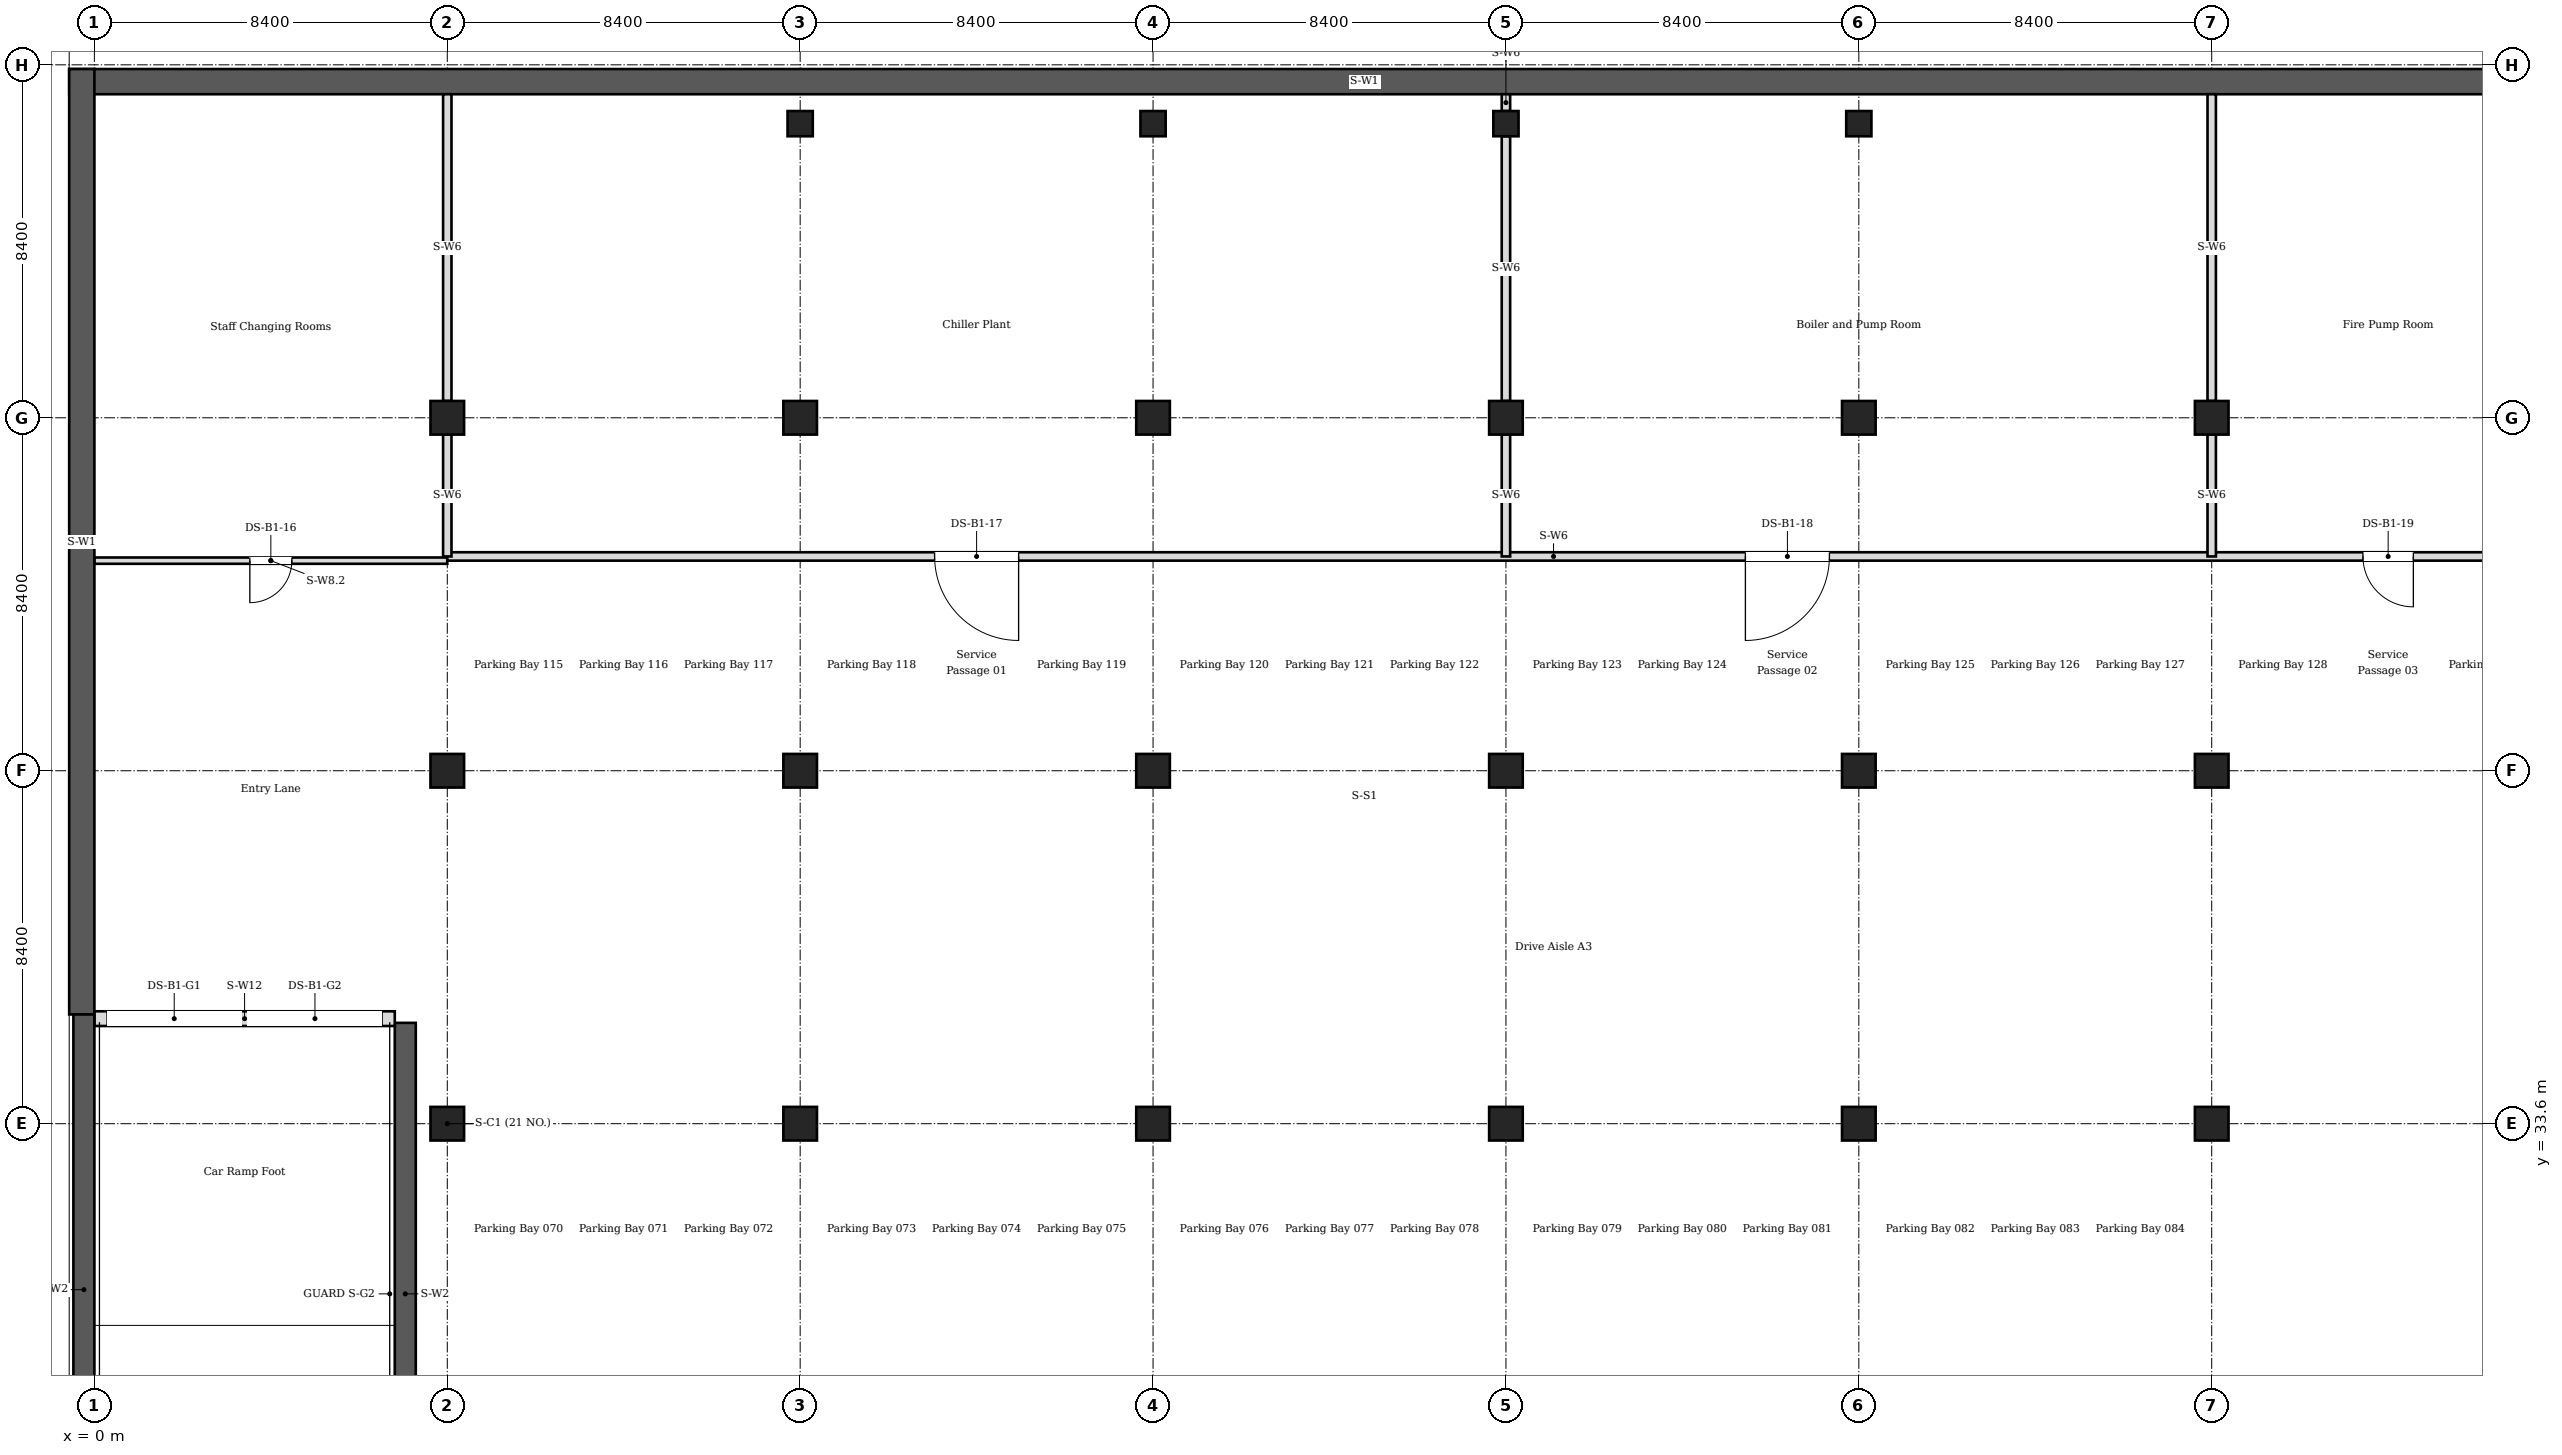
"""IFC4 building model, lengths in metres.
Left out: names, types, materials, properties, quantities, classifications, styles, units other than length and angle.
Written with IfcOpenShell. Run it as: python <this file> out.ifc"""

import sys

from ifc_helpers import new_model, si_unit, direction, frame, frame_2d, origin, origin_2d, place, context, subcontext, project, spatial, rectangle, extrude, element, fill, save


model = new_model("IFC4")
c1 = context("Model", 3, precision=1e-05, world=origin(), true_north=direction((0.0, 1.0)))
c2 = subcontext(c1, "Body", "Model", "MODEL_VIEW")
j1 = project(units=[si_unit("LENGTHUNIT", "METRE"), si_unit("PLANEANGLEUNIT", "RADIAN")], contexts=[c1])
p1 = place(None, origin())
s1 = spatial("IfcSite", under=j1, at=p1, CompositionType="ELEMENT")
p2 = place(p1, origin())
s2 = spatial("IfcBuilding", under=s1, at=p2, CompositionType="ELEMENT")
p3 = place(p2, frame((0.0, 0.0, -5.4)))
s3 = spatial("IfcBuildingStorey", under=s2, at=p3, CompositionType="ELEMENT", Elevation=-5.4)
p4 = place(p3, frame((156.5, 58.4, 0.0), z_axis=(0.0, 0.0, 1.0), x_axis=(-1.0, 0.0, 0.0)))
e1 = element("IfcWall", 1, at=p4, inside=s3, PredefinedType="SOLIDWALL", context=c2, shape_type="SweptSolid", body=[
    extrude(rectangle(XDim=157.1, YDim=0.6, at=frame_2d((78.55, 0.0))), origin(), (0.0, 0.0, 1.0), 4.95),
])
p5 = place(p3, frame((-0.3, 58.7, 0.0), z_axis=(0.0, 0.0, 1.0), x_axis=(0.0, -1.0, 0.0)))
e2 = element("IfcWall", 2, at=p5, inside=s3, PredefinedType="SOLIDWALL", context=c2, shape_type="SweptSolid", body=[
    extrude(rectangle(XDim=22.5, YDim=0.6, at=frame_2d((11.25, 0.0))), origin(), (0.0, 0.0, 1.0), 4.95),
])
p6 = place(p3, frame((-0.25, -10.5, -1.2), z_axis=(0.0, 0.0, 1.0), x_axis=(0.0, 1.0, 0.0)))
e3 = element("IfcWall", 3, at=p6, inside=s3, PredefinedType="SOLIDWALL", context=c2, shape_type="SweptSolid", body=[
    extrude(rectangle(XDim=46.7, YDim=0.5, at=frame_2d((23.35, 0.0))), origin(), (0.0, 0.0, 1.0), 6.6),
])
p7 = place(p3, frame((7.4, -10.5, -1.2), z_axis=(0.0, 0.0, 1.0), x_axis=(0.0, 1.0, 0.0)))
e4 = element("IfcWall", 4, at=p7, inside=s3, PredefinedType="SOLIDWALL", context=c2, shape_type="SweptSolid", body=[
    extrude(rectangle(XDim=46.5, YDim=0.5, at=frame_2d((23.25, 0.0))), origin(), (0.0, 0.0, 1.0), 6.6),
])
p8 = place(p3, frame((0.0, 36.1, 0.0), z_axis=(0.0, 0.0, 1.0), x_axis=(1.0, 0.0, 0.0)))
e5 = element("IfcWall", 5, at=p8, inside=s3, PredefinedType="SOLIDWALL", context=c2, shape_type="SweptSolid", body=[
    extrude(rectangle(XDim=7.15, YDim=0.35, at=frame_2d((3.575, 0.0))), origin(), (0.0, 0.0, 1.0), 4.95),
])
p9 = place(p8, frame((0.3, 0.0, 0.0)))
e6 = element("IfcOpeningElement", 6, at=p9, cuts=e5, PredefinedType="OPENING", context=c2, shape_type="SweptSolid", body=[
    extrude(rectangle(XDim=3.2, YDim=2.4, at=frame_2d((1.6, 1.2))), frame((0.0, 0.185, 0.0), z_axis=(0.0, -1.0, 0.0), x_axis=(1.0, 0.0, 0.0)), (0.0, 0.0, 1.0), 0.37),
])
p10 = place(p8, frame((3.65, 0.0, 0.0)))
e7 = element("IfcOpeningElement", 7, at=p10, cuts=e5, PredefinedType="OPENING", context=c2, shape_type="SweptSolid", body=[
    extrude(rectangle(XDim=3.2, YDim=2.4, at=frame_2d((1.6, 1.2))), frame((0.0, 0.185, 0.0), z_axis=(0.0, -1.0, 0.0), x_axis=(1.0, 0.0, 0.0)), (0.0, 0.0, 1.0), 0.37),
])
for number, where, z_axis, x_axis in (
    (8, (8.4, 33.6, 0.0), (0.0, 0.0, 1.0), (1.0, 0.0, 0.0)),
    (9, (8.4, 42.0, 0.0), (0.0, 0.0, 1.0), (1.0, 0.0, 0.0)),
    (10, (8.4, 50.4, 0.0), (0.0, 0.0, 1.0), (1.0, 0.0, 0.0)),
    (11, (16.8, 33.6, 0.0), (0.0, 0.0, 1.0), (1.0, 0.0, 0.0)),
    (12, (16.8, 42.0, 0.0), (0.0, 0.0, 1.0), (1.0, 0.0, 0.0)),
    (13, (16.8, 50.4, 0.0), (0.0, 0.0, 1.0), (1.0, 0.0, 0.0)),
    (14, (25.2, 33.6, 0.0), (0.0, 0.0, 1.0), (1.0, 0.0, 0.0)),
    (15, (25.2, 42.0, 0.0), (0.0, 0.0, 1.0), (1.0, 0.0, 0.0)),
    (16, (25.2, 50.4, 0.0), (0.0, 0.0, 1.0), (1.0, 0.0, 0.0)),
    (17, (33.6, 33.6, 0.0), (0.0, 0.0, 1.0), (1.0, 0.0, 0.0)),
    (18, (33.6, 42.0, 0.0), (0.0, 0.0, 1.0), (1.0, 0.0, 0.0)),
    (19, (33.6, 50.4, 0.0), (0.0, 0.0, 1.0), (1.0, 0.0, 0.0)),
    (20, (42.0, 33.6, 0.0), (0.0, 0.0, 1.0), (1.0, 0.0, 0.0)),
    (21, (42.0, 42.0, 0.0), (0.0, 0.0, 1.0), (1.0, 0.0, 0.0)),
    (22, (42.0, 50.4, 0.0), (0.0, 0.0, 1.0), (1.0, 0.0, 0.0)),
    (23, (50.4, 33.6, 0.0), (0.0, 0.0, 1.0), (1.0, 0.0, 0.0)),
    (24, (50.4, 42.0, 0.0), (0.0, 0.0, 1.0), (1.0, 0.0, 0.0)),
    (25, (50.4, 50.4, 0.0), (0.0, 0.0, 1.0), (1.0, 0.0, 0.0)),
):
    element("IfcColumn", number, at=place(p3, frame(where, z_axis=z_axis, x_axis=x_axis)), inside=s3, PredefinedType="COLUMN", context=c2, shape_type="SweptSolid", body=[
        extrude(rectangle(XDim=0.8, YDim=0.8, at=origin_2d()), origin(), (0.0, 0.0, 1.0), 5.4),
    ])
for number, where, z_axis, x_axis in (
    (26, (16.8, 57.4, 0.0), (0.0, 0.0, 1.0), (1.0, 0.0, 0.0)),
    (27, (25.2, 57.4, 0.0), (0.0, 0.0, 1.0), (1.0, 0.0, 0.0)),
    (28, (33.6, 57.4, 0.0), (0.0, 0.0, 1.0), (1.0, 0.0, 0.0)),
    (29, (42.0, 57.4, 0.0), (0.0, 0.0, 1.0), (1.0, 0.0, 0.0)),
):
    element("IfcColumn", number, at=place(p3, frame(where, z_axis=z_axis, x_axis=x_axis)), inside=s3, PredefinedType="COLUMN", context=c2, shape_type="SweptSolid", body=[
        extrude(rectangle(XDim=0.6, YDim=0.6, at=origin_2d()), origin(), (0.0, 0.0, 1.0), 5.4),
    ])
p11 = place(p3, frame((0.0, 47.0, 0.0), z_axis=(0.0, 0.0, 1.0), x_axis=(1.0, 0.0, 0.0)))
e30 = element("IfcWall", 30, at=p11, inside=s3, PredefinedType="PARTITIONING", context=c2, shape_type="SweptSolid", body=[
    extrude(rectangle(XDim=8.4, YDim=0.15, at=frame_2d((4.2, 0.0))), origin(), (0.0, 0.0, 1.0), 4.95),
])
p12 = place(p11, frame((3.7, 0.0, 0.0)))
e31 = element("IfcOpeningElement", 31, at=p12, cuts=e30, PredefinedType="OPENING", context=c2, shape_type="SweptSolid", body=[
    extrude(rectangle(XDim=1.0, YDim=2.1, at=frame_2d((0.5, 1.05))), frame((0.0, 0.085, 0.0), z_axis=(0.0, -1.0, 0.0), x_axis=(1.0, 0.0, 0.0)), (0.0, 0.0, 1.0), 0.17),
])
p13 = place(p3, frame((8.4, 47.1, 0.0), z_axis=(0.0, 0.0, 1.0), x_axis=(1.0, 0.0, 0.0)))
e32 = element("IfcWall", 32, at=p13, inside=s3, PredefinedType="PARTITIONING", context=c2, shape_type="SweptSolid", body=[
    extrude(rectangle(XDim=134.4, YDim=0.2, at=frame_2d((67.2, 0.0))), origin(), (0.0, 0.0, 1.0), 4.95),
])
p14 = place(p13, frame((11.6, 0.0, 0.0)))
e33 = element("IfcOpeningElement", 33, at=p14, cuts=e32, PredefinedType="OPENING", context=c2, shape_type="SweptSolid", body=[
    extrude(rectangle(XDim=2.0, YDim=2.4, at=frame_2d((1.0, 1.2))), frame((0.0, 0.11, 0.0), z_axis=(0.0, -1.0, 0.0), x_axis=(1.0, 0.0, 0.0)), (0.0, 0.0, 1.0), 0.22),
])
p15 = place(p13, frame((30.9, 0.0, 0.0)))
e34 = element("IfcOpeningElement", 34, at=p15, cuts=e32, PredefinedType="OPENING", context=c2, shape_type="SweptSolid", body=[
    extrude(rectangle(XDim=2.0, YDim=2.4, at=frame_2d((1.0, 1.2))), frame((0.0, 0.11, 0.0), z_axis=(0.0, -1.0, 0.0), x_axis=(1.0, 0.0, 0.0)), (0.0, 0.0, 1.0), 0.22),
])
p16 = place(p13, frame((45.6, 0.0, 0.0)))
e35 = element("IfcOpeningElement", 35, at=p16, cuts=e32, PredefinedType="OPENING", context=c2, shape_type="SweptSolid", body=[
    extrude(rectangle(XDim=1.2, YDim=2.4, at=frame_2d((0.6, 1.2))), frame((0.0, 0.11, 0.0), z_axis=(0.0, -1.0, 0.0), x_axis=(1.0, 0.0, 0.0)), (0.0, 0.0, 1.0), 0.22),
])
p17 = place(p13, frame((56.1, 0.0, 0.0)))
e36 = element("IfcOpeningElement", 36, at=p17, cuts=e32, PredefinedType="OPENING", context=c2, shape_type="SweptSolid", body=[
    extrude(rectangle(XDim=2.0, YDim=2.4, at=frame_2d((1.0, 1.2))), frame((0.0, 0.11, 0.0), z_axis=(0.0, -1.0, 0.0), x_axis=(1.0, 0.0, 0.0)), (0.0, 0.0, 1.0), 0.22),
])
p18 = place(p13, frame((78.8, 0.0, 0.0)))
e37 = element("IfcOpeningElement", 37, at=p18, cuts=e32, PredefinedType="OPENING", context=c2, shape_type="SweptSolid", body=[
    extrude(rectangle(XDim=2.0, YDim=2.4, at=frame_2d((1.0, 1.2))), frame((0.0, 0.11, 0.0), z_axis=(0.0, -1.0, 0.0), x_axis=(1.0, 0.0, 0.0)), (0.0, 0.0, 1.0), 0.22),
])
p19 = place(p13, frame((87.6, 0.0, 0.0)))
e38 = element("IfcOpeningElement", 38, at=p19, cuts=e32, PredefinedType="OPENING", context=c2, shape_type="SweptSolid", body=[
    extrude(rectangle(XDim=1.2, YDim=2.4, at=frame_2d((0.6, 1.2))), frame((0.0, 0.11, 0.0), z_axis=(0.0, -1.0, 0.0), x_axis=(1.0, 0.0, 0.0)), (0.0, 0.0, 1.0), 0.22),
])
p20 = place(p13, frame((98.1, 0.0, 0.0)))
e39 = element("IfcOpeningElement", 39, at=p20, cuts=e32, PredefinedType="OPENING", context=c2, shape_type="SweptSolid", body=[
    extrude(rectangle(XDim=2.0, YDim=2.4, at=frame_2d((1.0, 1.2))), frame((0.0, 0.11, 0.0), z_axis=(0.0, -1.0, 0.0), x_axis=(1.0, 0.0, 0.0)), (0.0, 0.0, 1.0), 0.22),
])
p21 = place(p13, frame((112.8, 0.0, 0.0)))
e40 = element("IfcOpeningElement", 40, at=p21, cuts=e32, PredefinedType="OPENING", context=c2, shape_type="SweptSolid", body=[
    extrude(rectangle(XDim=1.2, YDim=2.4, at=frame_2d((0.6, 1.2))), frame((0.0, 0.11, 0.0), z_axis=(0.0, -1.0, 0.0), x_axis=(1.0, 0.0, 0.0)), (0.0, 0.0, 1.0), 0.22),
])
p22 = place(p13, frame((123.3, 0.0, 0.0)))
e41 = element("IfcOpeningElement", 41, at=p22, cuts=e32, PredefinedType="OPENING", context=c2, shape_type="SweptSolid", body=[
    extrude(rectangle(XDim=2.0, YDim=2.4, at=frame_2d((1.0, 1.2))), frame((0.0, 0.11, 0.0), z_axis=(0.0, -1.0, 0.0), x_axis=(1.0, 0.0, 0.0)), (0.0, 0.0, 1.0), 0.22),
])
p23 = place(p3, frame((8.4, 47.1, 0.0), z_axis=(0.0, 0.0, 1.0), x_axis=(0.0, 1.0, 0.0)))
e42 = element("IfcWall", 42, at=p23, inside=s3, PredefinedType="PARTITIONING", context=c2, shape_type="SweptSolid", body=[
    extrude(rectangle(XDim=2.9, YDim=0.2, at=frame_2d((1.45, 0.0))), origin(), (0.0, 0.0, 1.0), 4.95),
])
p24 = place(p3, frame((8.4, 50.8, 0.0), z_axis=(0.0, 0.0, 1.0), x_axis=(0.0, 1.0, 0.0)))
e43 = element("IfcWall", 43, at=p24, inside=s3, PredefinedType="PARTITIONING", context=c2, shape_type="SweptSolid", body=[
    extrude(rectangle(XDim=7.3, YDim=0.2, at=frame_2d((3.65, 0.0))), origin(), (0.0, 0.0, 1.0), 4.95),
])
p25 = place(p3, frame((33.6, 47.1, 0.0), z_axis=(0.0, 0.0, 1.0), x_axis=(0.0, 1.0, 0.0)))
e44 = element("IfcWall", 44, at=p25, inside=s3, PredefinedType="PARTITIONING", context=c2, shape_type="SweptSolid", body=[
    extrude(rectangle(XDim=2.9, YDim=0.2, at=frame_2d((1.45, 0.0))), origin(), (0.0, 0.0, 1.0), 4.95),
])
p26 = place(p3, frame((33.6, 50.8, 0.0), z_axis=(0.0, 0.0, 1.0), x_axis=(0.0, 1.0, 0.0)))
e45 = element("IfcWall", 45, at=p26, inside=s3, PredefinedType="PARTITIONING", context=c2, shape_type="SweptSolid", body=[
    extrude(rectangle(XDim=6.3, YDim=0.2, at=frame_2d((3.15, 0.0))), origin(), (0.0, 0.0, 1.0), 4.95),
])
p27 = place(p3, frame((33.6, 57.7, 0.0), z_axis=(0.0, 0.0, 1.0), x_axis=(0.0, 1.0, 0.0)))
e46 = element("IfcWall", 46, at=p27, inside=s3, PredefinedType="PARTITIONING", context=c2, shape_type="SweptSolid", body=[
    extrude(rectangle(XDim=0.4, YDim=0.2, at=frame_2d((0.2, 0.0))), origin(), (0.0, 0.0, 1.0), 4.95),
])
p28 = place(p3, frame((50.4, 47.1, 0.0), z_axis=(0.0, 0.0, 1.0), x_axis=(0.0, 1.0, 0.0)))
e47 = element("IfcWall", 47, at=p28, inside=s3, PredefinedType="PARTITIONING", context=c2, shape_type="SweptSolid", body=[
    extrude(rectangle(XDim=2.9, YDim=0.2, at=frame_2d((1.45, 0.0))), origin(), (0.0, 0.0, 1.0), 4.95),
])
p29 = place(p3, frame((50.4, 50.8, 0.0), z_axis=(0.0, 0.0, 1.0), x_axis=(0.0, 1.0, 0.0)))
e48 = element("IfcWall", 48, at=p29, inside=s3, PredefinedType="PARTITIONING", context=c2, shape_type="SweptSolid", body=[
    extrude(rectangle(XDim=7.3, YDim=0.2, at=frame_2d((3.65, 0.0))), origin(), (0.0, 0.0, 1.0), 4.95),
])
p30 = place(p9, origin())
e49 = element("IfcDoor", 49, at=p30, inside=s3, OperationType="SLIDING_TO_LEFT", PredefinedType="DOOR", context=c2, shape_type="SweptSolid", body=[
    extrude(rectangle(XDim=3.2, YDim=2.4, at=frame_2d((1.6, 1.2))), frame((0.0, 0.025, 0.0), z_axis=(0.0, -1.0, 0.0), x_axis=(1.0, 0.0, 0.0)), (0.0, 0.0, 1.0), 0.05),
])
fill(e6, e49)
p31 = place(p10, origin())
e50 = element("IfcDoor", 50, at=p31, inside=s3, OperationType="SLIDING_TO_RIGHT", PredefinedType="DOOR", context=c2, shape_type="SweptSolid", body=[
    extrude(rectangle(XDim=3.2, YDim=2.4, at=frame_2d((1.6, 1.2))), frame((0.0, 0.025, 0.0), z_axis=(0.0, -1.0, 0.0), x_axis=(1.0, 0.0, 0.0)), (0.0, 0.0, 1.0), 0.05),
])
fill(e7, e50)
p32 = place(p12, origin())
e51 = element("IfcDoor", 51, at=p32, inside=s3, OperationType="SINGLE_SWING_RIGHT", PredefinedType="DOOR", context=c2, shape_type="SweptSolid", body=[
    extrude(rectangle(XDim=1.0, YDim=2.1, at=frame_2d((0.5, 1.05))), frame((0.0, 0.025, 0.0), z_axis=(0.0, -1.0, 0.0), x_axis=(1.0, 0.0, 0.0)), (0.0, 0.0, 1.0), 0.05),
])
fill(e31, e51)
p33 = place(p14, origin())
e52 = element("IfcDoor", 52, at=p33, inside=s3, OperationType="DOUBLE_DOOR_SINGLE_SWING", PredefinedType="DOOR", context=c2, shape_type="SweptSolid", body=[
    extrude(rectangle(XDim=2.0, YDim=2.4, at=frame_2d((1.0, 1.2))), frame((0.0, 0.025, 0.0), z_axis=(0.0, -1.0, 0.0), x_axis=(1.0, 0.0, 0.0)), (0.0, 0.0, 1.0), 0.05),
])
fill(e33, e52)
p34 = place(p15, origin())
e53 = element("IfcDoor", 53, at=p34, inside=s3, OperationType="DOUBLE_DOOR_SINGLE_SWING", PredefinedType="DOOR", context=c2, shape_type="SweptSolid", body=[
    extrude(rectangle(XDim=2.0, YDim=2.4, at=frame_2d((1.0, 1.2))), frame((0.0, 0.025, 0.0), z_axis=(0.0, -1.0, 0.0), x_axis=(1.0, 0.0, 0.0)), (0.0, 0.0, 1.0), 0.05),
])
fill(e34, e53)
p35 = place(p16, origin())
e54 = element("IfcDoor", 54, at=p35, inside=s3, OperationType="SINGLE_SWING_LEFT", PredefinedType="DOOR", context=c2, shape_type="SweptSolid", body=[
    extrude(rectangle(XDim=1.2, YDim=2.4, at=frame_2d((0.6, 1.2))), frame((0.0, 0.025, 0.0), z_axis=(0.0, -1.0, 0.0), x_axis=(1.0, 0.0, 0.0)), (0.0, 0.0, 1.0), 0.05),
])
fill(e35, e54)
save(model, sys.argv[1])
